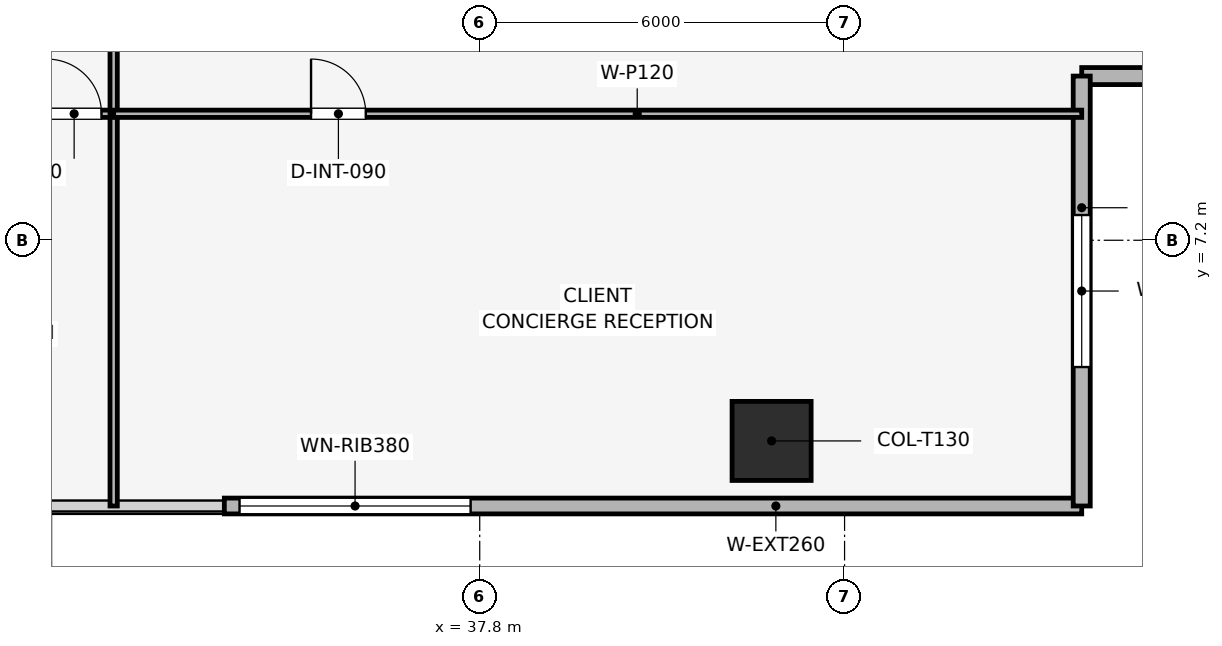
"""IFC4 building model, lengths in metres.
Left out: names, types, materials, properties, quantities, classifications, styles, units other than length and angle.
Written with IfcOpenShell. Run it as: python <this file> out.ifc"""

import sys

from ifc_helpers import new_model, si_unit, direction, frame, frame_2d, origin, origin_2d, place, context, subcontext, project, spatial, rectangle, extrude, element, fill, save


model = new_model("IFC4")
c1 = context("Model", 3, precision=1e-05, world=origin(), true_north=direction((0.0, 1.0)))
c2 = subcontext(c1, "Body", "Model", "MODEL_VIEW")
j1 = project(units=[si_unit("LENGTHUNIT", "METRE"), si_unit("PLANEANGLEUNIT", "RADIAN")], contexts=[c1])
p1 = place(None, origin())
s1 = spatial("IfcSite", under=j1, at=p1, CompositionType="ELEMENT")
p2 = place(p1, origin())
s2 = spatial("IfcBuilding", under=s1, at=p2, CompositionType="ELEMENT")
p3 = place(p2, frame((0.0, 0.0, 125.1)))
s3 = spatial("IfcBuildingStorey", under=s2, at=p3, CompositionType="ELEMENT", Elevation=125.1)
p4 = place(p3, frame((42.6, 3.9, 0.003), z_axis=(0.0, 0.0, 1.0), x_axis=(1.0, 0.0, 0.0)))
e1 = element("IfcColumn", 1, at=p4, inside=s3, PredefinedType="COLUMN", context=c2, shape_type="SweptSolid", body=[
    extrude(rectangle(XDim=1.3, YDim=1.3, at=origin_2d()), origin(), (0.0, 0.0, 1.0), 3.644),
])
p5 = place(p3, frame((47.7, 2.83, 0.0), z_axis=(0.0, 0.0, 1.0), x_axis=(-1.0, 0.0, 0.0)))
e2 = element("IfcWall", 2, at=p5, inside=s3, PredefinedType="SOLIDWALL", context=c2, shape_type="SweptSolid", body=[
    extrude(rectangle(XDim=14.1, YDim=0.26, at=frame_2d((7.05, 0.0))), origin(), (0.0, 0.0, 1.0), 3.65),
])
p6 = place(p5, frame((10.05, 0.0, 0.9)))
e3 = element("IfcOpeningElement", 3, at=p6, cuts=e2, PredefinedType="OPENING", context=c2, shape_type="SweptSolid", body=[
    extrude(rectangle(XDim=3.8, YDim=1.9, at=frame_2d((1.9, 0.95))), frame((0.0, 0.14, 0.0), z_axis=(0.0, -1.0, 0.0), x_axis=(1.0, 0.0, 0.0)), (0.0, 0.0, 1.0), 0.28),
])
p7 = place(p3, frame((54.77, 9.9, 0.0), z_axis=(0.0, 0.0, 1.0), x_axis=(-1.0, 0.0, 0.0)))
e4 = element("IfcWall", 4, at=p7, inside=s3, PredefinedType="SOLIDWALL", context=c2, shape_type="SweptSolid", body=[
    extrude(rectangle(XDim=7.07, YDim=0.28, at=frame_2d((3.535, 0.0))), origin(), (0.0, 0.0, 1.0), 3.65),
])
p8 = place(p7, frame((2.285, 0.0, 0.9)))
e5 = element("IfcOpeningElement", 5, at=p8, cuts=e4, PredefinedType="OPENING", context=c2, shape_type="SweptSolid", body=[
    extrude(rectangle(XDim=2.5, YDim=1.9, at=frame_2d((1.25, 0.95))), frame((0.0, 0.15, 0.0), z_axis=(0.0, -1.0, 0.0), x_axis=(1.0, 0.0, 0.0)), (0.0, 0.0, 1.0), 0.3),
])
p9 = place(p3, frame((47.7, 9.9, 0.0), z_axis=(0.0, 0.0, 1.0), x_axis=(0.0, -1.0, 0.0)))
e6 = element("IfcWall", 6, at=p9, inside=s3, PredefinedType="SOLIDWALL", context=c2, shape_type="SweptSolid", body=[
    extrude(rectangle(XDim=7.07, YDim=0.28, at=frame_2d((3.535, 0.0))), origin(), (0.0, 0.0, 1.0), 3.65),
])
p10 = place(p9, frame((2.285, 0.0, 0.9)))
e7 = element("IfcOpeningElement", 7, at=p10, cuts=e6, PredefinedType="OPENING", context=c2, shape_type="SweptSolid", body=[
    extrude(rectangle(XDim=2.5, YDim=1.9, at=frame_2d((1.25, 0.95))), frame((0.0, 0.15, 0.0), z_axis=(0.0, -1.0, 0.0), x_axis=(1.0, 0.0, 0.0)), (0.0, 0.0, 1.0), 0.3),
])
p11 = place(p3, frame((26.015, 9.28, 0.0), z_axis=(0.0, 0.0, 1.0), x_axis=(1.0, 0.0, 0.0)))
e8 = element("IfcWall", 8, at=p11, inside=s3, PredefinedType="PARTITIONING", context=c2, shape_type="SweptSolid", body=[
    extrude(rectangle(XDim=5.765, YDim=0.12, at=frame_2d((2.883, 0.0))), origin(), (0.0, 0.0, 1.0), 3.185),
])
p12 = place(p11, frame((4.665, 0.0, 0.0)))
e9 = element("IfcOpeningElement", 9, at=p12, cuts=e8, PredefinedType="OPENING", context=c2, shape_type="SweptSolid", body=[
    extrude(rectangle(XDim=0.9, YDim=2.1, at=frame_2d((0.45, 1.05))), frame((0.0, 0.07, 0.0), z_axis=(0.0, -1.0, 0.0), x_axis=(1.0, 0.0, 0.0)), (0.0, 0.0, 1.0), 0.14),
])
p13 = place(p3, frame((31.78, 2.83, 0.0), z_axis=(0.0, 0.0, 1.0), x_axis=(0.0, 1.0, 0.0)))
e10 = element("IfcWall", 10, at=p13, inside=s3, PredefinedType="PARTITIONING", context=c2, shape_type="SweptSolid", body=[
    extrude(rectangle(XDim=14.77, YDim=0.12, at=frame_2d((7.385, 0.0))), origin(), (0.0, 0.0, 1.0), 3.035),
])
p14 = place(p3, frame((31.78, 9.28, 0.0), z_axis=(0.0, 0.0, 1.0), x_axis=(1.0, 0.0, 0.0)))
e11 = element("IfcWall", 11, at=p14, inside=s3, PredefinedType="PARTITIONING", context=c2, shape_type="SweptSolid", body=[
    extrude(rectangle(XDim=15.92, YDim=0.12, at=frame_2d((7.96, 0.0))), origin(), (0.0, 0.0, 1.0), 3.035),
])
p15 = place(p14, frame((3.246, 0.0, 0.0)))
e12 = element("IfcOpeningElement", 12, at=p15, cuts=e11, PredefinedType="OPENING", context=c2, shape_type="SweptSolid", body=[
    extrude(rectangle(XDim=0.9, YDim=2.1, at=frame_2d((0.45, 1.05))), frame((0.0, 0.07, 0.0), z_axis=(0.0, -1.0, 0.0), x_axis=(1.0, 0.0, 0.0)), (0.0, 0.0, 1.0), 0.14),
])
p16 = place(p6, origin())
e13 = element("IfcWindow", 13, at=p16, inside=s3, PartitioningType="SINGLE_PANEL", PredefinedType="WINDOW", context=c2, shape_type="SweptSolid", body=[
    extrude(rectangle(XDim=3.8, YDim=1.9, at=frame_2d((1.9, 0.95))), frame((0.0, 0.03, 0.0), z_axis=(0.0, -1.0, 0.0), x_axis=(1.0, 0.0, 0.0)), (0.0, 0.0, 1.0), 0.06),
])
fill(e3, e13)
p17 = place(p10, origin())
e14 = element("IfcWindow", 14, at=p17, inside=s3, PartitioningType="SINGLE_PANEL", PredefinedType="WINDOW", context=c2, shape_type="SweptSolid", body=[
    extrude(rectangle(XDim=2.5, YDim=1.9, at=frame_2d((1.25, 0.95))), frame((0.0, 0.03, 0.0), z_axis=(0.0, -1.0, 0.0), x_axis=(1.0, 0.0, 0.0)), (0.0, 0.0, 1.0), 0.06),
])
fill(e7, e14)
p18 = place(p12, origin())
e15 = element("IfcDoor", 15, at=p18, inside=s3, OperationType="SINGLE_SWING_LEFT", PredefinedType="DOOR", context=c2, shape_type="SweptSolid", body=[
    extrude(rectangle(XDim=0.9, YDim=2.1, at=frame_2d((0.45, 1.05))), frame((0.0, 0.025, 0.0), z_axis=(0.0, -1.0, 0.0), x_axis=(1.0, 0.0, 0.0)), (0.0, 0.0, 1.0), 0.05),
])
fill(e9, e15)
p19 = place(p15, origin())
e16 = element("IfcDoor", 16, at=p19, inside=s3, OperationType="SINGLE_SWING_LEFT", PredefinedType="DOOR", context=c2, shape_type="SweptSolid", body=[
    extrude(rectangle(XDim=0.9, YDim=2.1, at=frame_2d((0.45, 1.05))), frame((0.0, 0.025, 0.0), z_axis=(0.0, -1.0, 0.0), x_axis=(1.0, 0.0, 0.0)), (0.0, 0.0, 1.0), 0.05),
])
fill(e12, e16)
save(model, sys.argv[1])
